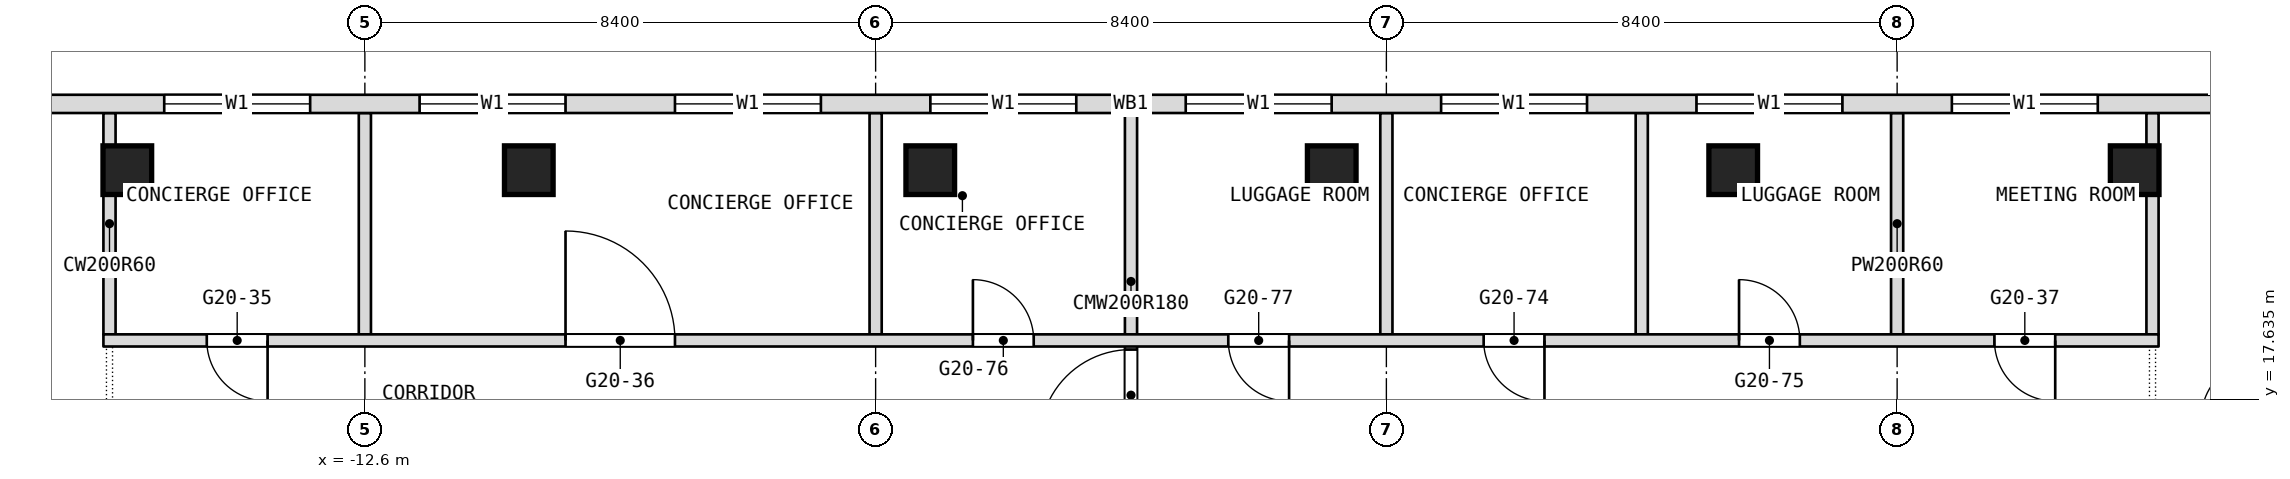
"""IFC4 building model, lengths in metres.
Left out: names, types, materials, properties, quantities, classifications, styles, units other than length and angle.
Written with IfcOpenShell. Run it as: python <this file> out.ifc"""

import sys

from ifc_helpers import new_model, si_unit, direction, frame, frame_2d, origin, origin_2d, place, context, subcontext, project, spatial, rectangle, extrude, element, fill, save


model = new_model("IFC4")
c1 = context("Model", 3, precision=1e-05, world=origin(), true_north=direction((0.0, 1.0)))
c2 = subcontext(c1, "Body", "Model", "MODEL_VIEW")
j1 = project(units=[si_unit("LENGTHUNIT", "METRE"), si_unit("PLANEANGLEUNIT", "RADIAN")], contexts=[c1])
p1 = place(None, origin())
s1 = spatial("IfcSite", under=j1, at=p1, CompositionType="ELEMENT")
p2 = place(p1, origin())
s2 = spatial("IfcBuilding", under=s1, at=p2, CompositionType="ELEMENT")
p3 = place(p2, frame((0.0, 0.0, 238.1)))
s3 = spatial("IfcBuildingStorey", under=s2, at=p3, CompositionType="ELEMENT", Elevation=238.1)
for number, where, z_axis, x_axis in (
    (1, (-16.507, 21.4, 0.0), (0.0, 0.0, 1.0), (1.0, 0.0, 0.0)),
    (2, (-9.904, 21.4, 0.0), (0.0, 0.0, 1.0), (1.0, 0.0, 0.0)),
    (3, (-3.302, 21.4, 0.0), (0.0, 0.0, 1.0), (1.0, 0.0, 0.0)),
    (4, (3.302, 21.4, 0.0), (0.0, 0.0, 1.0), (1.0, 0.0, 0.0)),
    (5, (9.904, 21.4, 0.0), (0.0, 0.0, 1.0), (1.0, 0.0, 0.0)),
    (6, (16.507, 21.4, 0.0), (0.0, 0.0, 1.0), (1.0, 0.0, 0.0)),
):
    element("IfcColumn", number, at=place(p3, frame(where, z_axis=z_axis, x_axis=x_axis)), inside=s3, PredefinedType="COLUMN", context=c2, shape_type="SweptSolid", body=[
        extrude(rectangle(XDim=0.8, YDim=0.8, at=origin_2d()), origin(), (0.0, 0.0, 1.0), 3.6),
    ])
for number, where, z_axis, x_axis in (
    (7, (16.8, 18.7, 0.0), (0.0, 0.0, 1.0), (0.0, 1.0, 0.0)),
    (8, (12.6, 18.7, 0.0), (0.0, 0.0, 1.0), (0.0, 1.0, 0.0)),
    (9, (8.4, 18.7, 0.0), (0.0, 0.0, 1.0), (0.0, 1.0, 0.0)),
    (10, (4.2, 18.7, 0.0), (0.0, 0.0, 1.0), (0.0, 1.0, 0.0)),
):
    element("IfcWall", number, at=place(p3, frame(where, z_axis=z_axis, x_axis=x_axis)), inside=s3, PredefinedType="PARTITIONING", context=c2, shape_type="SweptSolid", body=[
        extrude(rectangle(XDim=3.64, YDim=0.2, at=frame_2d((1.82, 0.0))), origin(), (0.0, 0.0, 1.0), 3.34),
    ])
p4 = place(p3, frame((0.0, 16.8, 0.0), z_axis=(0.0, 0.0, 1.0), x_axis=(0.0, 1.0, 0.0)))
e11 = element("IfcWall", 11, at=p4, inside=s3, PredefinedType="PARTITIONING", context=c2, shape_type="SweptSolid", body=[
    extrude(rectangle(XDim=5.54, YDim=0.2, at=frame_2d((2.77, 0.0))), origin(), (0.0, 0.0, 1.0), 3.34),
])
p5 = place(p4, frame((0.15, 0.0, 0.0)))
e12 = element("IfcOpeningElement", 12, at=p5, cuts=e11, PredefinedType="OPENING", context=c2, shape_type="SweptSolid", body=[
    extrude(rectangle(XDim=1.5, YDim=2.1, at=frame_2d((0.75, 1.05))), frame((0.0, 0.1, 0.0), z_axis=(0.0, -1.0, 0.0), x_axis=(1.0, 0.0, 0.0)), (0.0, 0.0, 1.0), 0.2),
])
for number, where, z_axis, x_axis in (
    (13, (-4.2, 18.7, 0.0), (0.0, 0.0, 1.0), (0.0, 1.0, 0.0)),
    (14, (-12.6, 18.7, 0.0), (0.0, 0.0, 1.0), (0.0, 1.0, 0.0)),
    (15, (-16.8, 18.7, 0.0), (0.0, 0.0, 1.0), (0.0, 1.0, 0.0)),
):
    element("IfcWall", number, at=place(p3, frame(where, z_axis=z_axis, x_axis=x_axis)), inside=s3, PredefinedType="PARTITIONING", context=c2, shape_type="SweptSolid", body=[
        extrude(rectangle(XDim=3.64, YDim=0.2, at=frame_2d((1.82, 0.0))), origin(), (0.0, 0.0, 1.0), 3.34),
    ])
p6 = place(p3, frame((-16.9, 18.6, 0.0), z_axis=(0.0, 0.0, 1.0), x_axis=(1.0, 0.0, 0.0)))
e16 = element("IfcWall", 16, at=p6, inside=s3, PredefinedType="PARTITIONING", context=c2, shape_type="SweptSolid", body=[
    extrude(rectangle(XDim=33.8, YDim=0.2, at=frame_2d((16.9, 0.0))), origin(), (0.0, 0.0, 1.0), 3.34),
])
p7 = place(p6, frame((1.7, 0.0, 0.0)))
e17 = element("IfcOpeningElement", 17, at=p7, cuts=e16, PredefinedType="OPENING", context=c2, shape_type="SweptSolid", body=[
    extrude(rectangle(XDim=1.0, YDim=2.1, at=frame_2d((0.5, 1.05))), frame((0.0, 0.1, 0.0), z_axis=(0.0, -1.0, 0.0), x_axis=(1.0, 0.0, 0.0)), (0.0, 0.0, 1.0), 0.2),
])
p8 = place(p6, frame((7.6, 0.0, 0.0)))
e18 = element("IfcOpeningElement", 18, at=p8, cuts=e16, PredefinedType="OPENING", context=c2, shape_type="SweptSolid", body=[
    extrude(rectangle(XDim=1.8, YDim=2.1, at=frame_2d((0.9, 1.05))), frame((0.0, 0.1, 0.0), z_axis=(0.0, -1.0, 0.0), x_axis=(1.0, 0.0, 0.0)), (0.0, 0.0, 1.0), 0.2),
])
p9 = place(p6, frame((31.1, 0.0, 0.0)))
e19 = element("IfcOpeningElement", 19, at=p9, cuts=e16, PredefinedType="OPENING", context=c2, shape_type="SweptSolid", body=[
    extrude(rectangle(XDim=1.0, YDim=2.1, at=frame_2d((0.5, 1.05))), frame((0.0, 0.1, 0.0), z_axis=(0.0, -1.0, 0.0), x_axis=(1.0, 0.0, 0.0)), (0.0, 0.0, 1.0), 0.2),
])
p10 = place(p6, frame((22.7, 0.0, 0.0)))
e20 = element("IfcOpeningElement", 20, at=p10, cuts=e16, PredefinedType="OPENING", context=c2, shape_type="SweptSolid", body=[
    extrude(rectangle(XDim=1.0, YDim=2.1, at=frame_2d((0.5, 1.05))), frame((0.0, 0.1, 0.0), z_axis=(0.0, -1.0, 0.0), x_axis=(1.0, 0.0, 0.0)), (0.0, 0.0, 1.0), 0.2),
])
p11 = place(p6, frame((26.9, 0.0, 0.0)))
e21 = element("IfcOpeningElement", 21, at=p11, cuts=e16, PredefinedType="OPENING", context=c2, shape_type="SweptSolid", body=[
    extrude(rectangle(XDim=1.0, YDim=2.1, at=frame_2d((0.5, 1.05))), frame((0.0, 0.1, 0.0), z_axis=(0.0, -1.0, 0.0), x_axis=(1.0, 0.0, 0.0)), (0.0, 0.0, 1.0), 0.2),
])
p12 = place(p6, frame((14.3, 0.0, 0.0)))
e22 = element("IfcOpeningElement", 22, at=p12, cuts=e16, PredefinedType="OPENING", context=c2, shape_type="SweptSolid", body=[
    extrude(rectangle(XDim=1.0, YDim=2.1, at=frame_2d((0.5, 1.05))), frame((0.0, 0.1, 0.0), z_axis=(0.0, -1.0, 0.0), x_axis=(1.0, 0.0, 0.0)), (0.0, 0.0, 1.0), 0.2),
])
p13 = place(p6, frame((18.5, 0.0, 0.0)))
e23 = element("IfcOpeningElement", 23, at=p13, cuts=e16, PredefinedType="OPENING", context=c2, shape_type="SweptSolid", body=[
    extrude(rectangle(XDim=1.0, YDim=2.1, at=frame_2d((0.5, 1.05))), frame((0.0, 0.1, 0.0), z_axis=(0.0, -1.0, 0.0), x_axis=(1.0, 0.0, 0.0)), (0.0, 0.0, 1.0), 0.2),
])
p14 = place(p3, frame((19.206, 22.49, 0.0), z_axis=(0.0, 0.0, 1.0), x_axis=(-1.0, 0.0, 0.0)))
e24 = element("IfcWall", 24, at=p14, inside=s3, PredefinedType="NOTDEFINED", context=c2, shape_type="SweptSolid", body=[
    extrude(rectangle(XDim=38.412, YDim=0.3, at=frame_2d((19.206, 0.0))), origin(), (0.0, 0.0, 1.0), 3.6),
])
p15 = place(p14, frame((3.306, 0.0, 0.9)))
e25 = element("IfcOpeningElement", 25, at=p15, cuts=e24, PredefinedType="OPENING", context=c2, shape_type="SweptSolid", body=[
    extrude(rectangle(XDim=2.4, YDim=2.1, at=frame_2d((1.2, 1.05))), frame((0.0, 0.15, 0.0), z_axis=(0.0, -1.0, 0.0), x_axis=(1.0, 0.0, 0.0)), (0.0, 0.0, 1.0), 0.3),
])
p16 = place(p14, frame((7.506, 0.0, 0.9)))
e26 = element("IfcOpeningElement", 26, at=p16, cuts=e24, PredefinedType="OPENING", context=c2, shape_type="SweptSolid", body=[
    extrude(rectangle(XDim=2.4, YDim=2.1, at=frame_2d((1.2, 1.05))), frame((0.0, 0.15, 0.0), z_axis=(0.0, -1.0, 0.0), x_axis=(1.0, 0.0, 0.0)), (0.0, 0.0, 1.0), 0.3),
])
p17 = place(p14, frame((11.706, 0.0, 0.9)))
e27 = element("IfcOpeningElement", 27, at=p17, cuts=e24, PredefinedType="OPENING", context=c2, shape_type="SweptSolid", body=[
    extrude(rectangle(XDim=2.4, YDim=2.1, at=frame_2d((1.2, 1.05))), frame((0.0, 0.15, 0.0), z_axis=(0.0, -1.0, 0.0), x_axis=(1.0, 0.0, 0.0)), (0.0, 0.0, 1.0), 0.3),
])
p18 = place(p14, frame((15.906, 0.0, 0.9)))
e28 = element("IfcOpeningElement", 28, at=p18, cuts=e24, PredefinedType="OPENING", context=c2, shape_type="SweptSolid", body=[
    extrude(rectangle(XDim=2.4, YDim=2.1, at=frame_2d((1.2, 1.05))), frame((0.0, 0.15, 0.0), z_axis=(0.0, -1.0, 0.0), x_axis=(1.0, 0.0, 0.0)), (0.0, 0.0, 1.0), 0.3),
])
p19 = place(p14, frame((20.106, 0.0, 0.9)))
e29 = element("IfcOpeningElement", 29, at=p19, cuts=e24, PredefinedType="OPENING", context=c2, shape_type="SweptSolid", body=[
    extrude(rectangle(XDim=2.4, YDim=2.1, at=frame_2d((1.2, 1.05))), frame((0.0, 0.15, 0.0), z_axis=(0.0, -1.0, 0.0), x_axis=(1.0, 0.0, 0.0)), (0.0, 0.0, 1.0), 0.3),
])
p20 = place(p14, frame((24.306, 0.0, 0.9)))
e30 = element("IfcOpeningElement", 30, at=p20, cuts=e24, PredefinedType="OPENING", context=c2, shape_type="SweptSolid", body=[
    extrude(rectangle(XDim=2.4, YDim=2.1, at=frame_2d((1.2, 1.05))), frame((0.0, 0.15, 0.0), z_axis=(0.0, -1.0, 0.0), x_axis=(1.0, 0.0, 0.0)), (0.0, 0.0, 1.0), 0.3),
])
p21 = place(p14, frame((28.506, 0.0, 0.9)))
e31 = element("IfcOpeningElement", 31, at=p21, cuts=e24, PredefinedType="OPENING", context=c2, shape_type="SweptSolid", body=[
    extrude(rectangle(XDim=2.4, YDim=2.1, at=frame_2d((1.2, 1.05))), frame((0.0, 0.15, 0.0), z_axis=(0.0, -1.0, 0.0), x_axis=(1.0, 0.0, 0.0)), (0.0, 0.0, 1.0), 0.3),
])
p22 = place(p14, frame((32.706, 0.0, 0.9)))
e32 = element("IfcOpeningElement", 32, at=p22, cuts=e24, PredefinedType="OPENING", context=c2, shape_type="SweptSolid", body=[
    extrude(rectangle(XDim=2.4, YDim=2.1, at=frame_2d((1.2, 1.05))), frame((0.0, 0.15, 0.0), z_axis=(0.0, -1.0, 0.0), x_axis=(1.0, 0.0, 0.0)), (0.0, 0.0, 1.0), 0.3),
])
p23 = place(p7, origin())
e33 = element("IfcDoor", 33, at=p23, inside=s3, OperationType="SINGLE_SWING_LEFT", PredefinedType="DOOR", context=c2, shape_type="SweptSolid", body=[
    extrude(rectangle(XDim=1.0, YDim=2.1, at=frame_2d((0.5, 1.05))), frame((0.0, 0.025, 0.0), z_axis=(0.0, -1.0, 0.0), x_axis=(1.0, 0.0, 0.0)), (0.0, 0.0, 1.0), 0.05),
])
fill(e17, e33)
p24 = place(p8, origin())
e34 = element("IfcDoor", 34, at=p24, inside=s3, OperationType="DOUBLE_DOOR_SINGLE_SWING", PredefinedType="DOOR", context=c2, shape_type="SweptSolid", body=[
    extrude(rectangle(XDim=1.8, YDim=2.1, at=frame_2d((0.9, 1.05))), frame((0.0, 0.025, 0.0), z_axis=(0.0, -1.0, 0.0), x_axis=(1.0, 0.0, 0.0)), (0.0, 0.0, 1.0), 0.05),
])
fill(e18, e34)
p25 = place(p9, origin())
e35 = element("IfcDoor", 35, at=p25, inside=s3, OperationType="SINGLE_SWING_LEFT", PredefinedType="DOOR", context=c2, shape_type="SweptSolid", body=[
    extrude(rectangle(XDim=1.0, YDim=2.1, at=frame_2d((0.5, 1.05))), frame((0.0, 0.025, 0.0), z_axis=(0.0, -1.0, 0.0), x_axis=(1.0, 0.0, 0.0)), (0.0, 0.0, 1.0), 0.05),
])
fill(e19, e35)
p26 = place(p10, origin())
e36 = element("IfcDoor", 36, at=p26, inside=s3, OperationType="SINGLE_SWING_RIGHT", PredefinedType="DOOR", context=c2, shape_type="SweptSolid", body=[
    extrude(rectangle(XDim=1.0, YDim=2.1, at=frame_2d((0.5, 1.05))), frame((0.0, 0.025, 0.0), z_axis=(0.0, -1.0, 0.0), x_axis=(1.0, 0.0, 0.0)), (0.0, 0.0, 1.0), 0.05),
])
fill(e20, e36)
p27 = place(p11, origin())
e37 = element("IfcDoor", 37, at=p27, inside=s3, OperationType="SINGLE_SWING_LEFT", PredefinedType="DOOR", context=c2, shape_type="SweptSolid", body=[
    extrude(rectangle(XDim=1.0, YDim=2.1, at=frame_2d((0.5, 1.05))), frame((0.0, 0.025, 0.0), z_axis=(0.0, -1.0, 0.0), x_axis=(1.0, 0.0, 0.0)), (0.0, 0.0, 1.0), 0.05),
])
fill(e21, e37)
p28 = place(p12, origin())
e38 = element("IfcDoor", 38, at=p28, inside=s3, OperationType="SINGLE_SWING_RIGHT", PredefinedType="DOOR", context=c2, shape_type="SweptSolid", body=[
    extrude(rectangle(XDim=1.0, YDim=2.1, at=frame_2d((0.5, 1.05))), frame((0.0, 0.025, 0.0), z_axis=(0.0, -1.0, 0.0), x_axis=(1.0, 0.0, 0.0)), (0.0, 0.0, 1.0), 0.05),
])
fill(e22, e38)
p29 = place(p13, origin())
e39 = element("IfcDoor", 39, at=p29, inside=s3, OperationType="SINGLE_SWING_LEFT", PredefinedType="DOOR", context=c2, shape_type="SweptSolid", body=[
    extrude(rectangle(XDim=1.0, YDim=2.1, at=frame_2d((0.5, 1.05))), frame((0.0, 0.025, 0.0), z_axis=(0.0, -1.0, 0.0), x_axis=(1.0, 0.0, 0.0)), (0.0, 0.0, 1.0), 0.05),
])
fill(e23, e39)
p30 = place(p15, origin())
e40 = element("IfcWindow", 40, at=p30, inside=s3, PartitioningType="SINGLE_PANEL", PredefinedType="WINDOW", context=c2, shape_type="SweptSolid", body=[
    extrude(rectangle(XDim=2.4, YDim=2.1, at=frame_2d((1.2, 1.05))), frame((0.0, 0.03, 0.0), z_axis=(0.0, -1.0, 0.0), x_axis=(1.0, 0.0, 0.0)), (0.0, 0.0, 1.0), 0.06),
])
fill(e25, e40)
p31 = place(p16, origin())
e41 = element("IfcWindow", 41, at=p31, inside=s3, PartitioningType="SINGLE_PANEL", PredefinedType="WINDOW", context=c2, shape_type="SweptSolid", body=[
    extrude(rectangle(XDim=2.4, YDim=2.1, at=frame_2d((1.2, 1.05))), frame((0.0, 0.03, 0.0), z_axis=(0.0, -1.0, 0.0), x_axis=(1.0, 0.0, 0.0)), (0.0, 0.0, 1.0), 0.06),
])
fill(e26, e41)
p32 = place(p17, origin())
e42 = element("IfcWindow", 42, at=p32, inside=s3, PartitioningType="SINGLE_PANEL", PredefinedType="WINDOW", context=c2, shape_type="SweptSolid", body=[
    extrude(rectangle(XDim=2.4, YDim=2.1, at=frame_2d((1.2, 1.05))), frame((0.0, 0.03, 0.0), z_axis=(0.0, -1.0, 0.0), x_axis=(1.0, 0.0, 0.0)), (0.0, 0.0, 1.0), 0.06),
])
fill(e27, e42)
p33 = place(p18, origin())
e43 = element("IfcWindow", 43, at=p33, inside=s3, PartitioningType="SINGLE_PANEL", PredefinedType="WINDOW", context=c2, shape_type="SweptSolid", body=[
    extrude(rectangle(XDim=2.4, YDim=2.1, at=frame_2d((1.2, 1.05))), frame((0.0, 0.03, 0.0), z_axis=(0.0, -1.0, 0.0), x_axis=(1.0, 0.0, 0.0)), (0.0, 0.0, 1.0), 0.06),
])
fill(e28, e43)
p34 = place(p19, origin())
e44 = element("IfcWindow", 44, at=p34, inside=s3, PartitioningType="SINGLE_PANEL", PredefinedType="WINDOW", context=c2, shape_type="SweptSolid", body=[
    extrude(rectangle(XDim=2.4, YDim=2.1, at=frame_2d((1.2, 1.05))), frame((0.0, 0.03, 0.0), z_axis=(0.0, -1.0, 0.0), x_axis=(1.0, 0.0, 0.0)), (0.0, 0.0, 1.0), 0.06),
])
fill(e29, e44)
p35 = place(p20, origin())
e45 = element("IfcWindow", 45, at=p35, inside=s3, PartitioningType="SINGLE_PANEL", PredefinedType="WINDOW", context=c2, shape_type="SweptSolid", body=[
    extrude(rectangle(XDim=2.4, YDim=2.1, at=frame_2d((1.2, 1.05))), frame((0.0, 0.03, 0.0), z_axis=(0.0, -1.0, 0.0), x_axis=(1.0, 0.0, 0.0)), (0.0, 0.0, 1.0), 0.06),
])
fill(e30, e45)
p36 = place(p21, origin())
e46 = element("IfcWindow", 46, at=p36, inside=s3, PartitioningType="SINGLE_PANEL", PredefinedType="WINDOW", context=c2, shape_type="SweptSolid", body=[
    extrude(rectangle(XDim=2.4, YDim=2.1, at=frame_2d((1.2, 1.05))), frame((0.0, 0.03, 0.0), z_axis=(0.0, -1.0, 0.0), x_axis=(1.0, 0.0, 0.0)), (0.0, 0.0, 1.0), 0.06),
])
fill(e31, e46)
p37 = place(p22, origin())
e47 = element("IfcWindow", 47, at=p37, inside=s3, PartitioningType="SINGLE_PANEL", PredefinedType="WINDOW", context=c2, shape_type="SweptSolid", body=[
    extrude(rectangle(XDim=2.4, YDim=2.1, at=frame_2d((1.2, 1.05))), frame((0.0, 0.03, 0.0), z_axis=(0.0, -1.0, 0.0), x_axis=(1.0, 0.0, 0.0)), (0.0, 0.0, 1.0), 0.06),
])
fill(e32, e47)
p38 = place(p5, origin())
e48 = element("IfcDoor", 48, at=p38, inside=s3, OperationType="DOUBLE_DOOR_DOUBLE_SWING", PredefinedType="DOOR", context=c2, shape_type="SweptSolid", body=[
    extrude(rectangle(XDim=1.5, YDim=2.1, at=frame_2d((0.75, 1.05))), frame((0.0, 0.025, 0.0), z_axis=(0.0, -1.0, 0.0), x_axis=(1.0, 0.0, 0.0)), (0.0, 0.0, 1.0), 0.05),
])
fill(e12, e48)
save(model, sys.argv[1])
